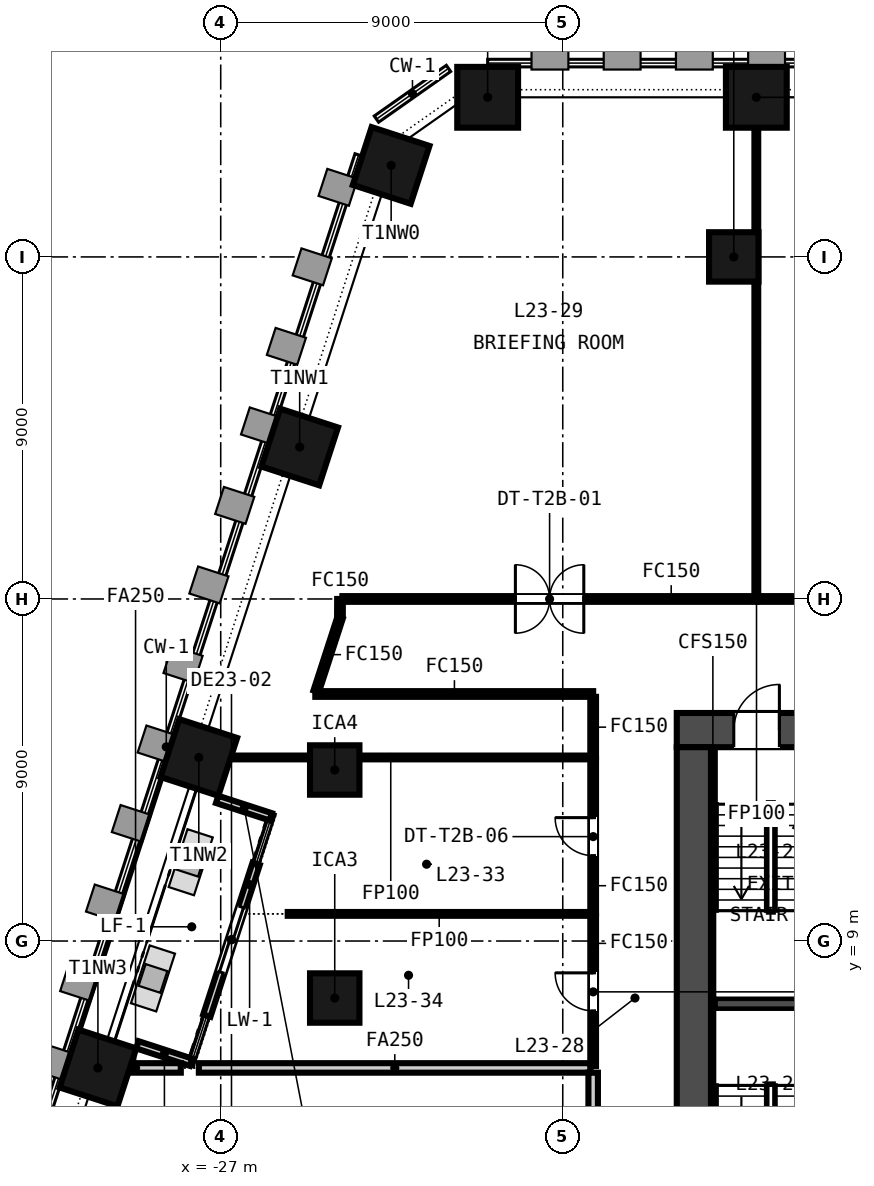
"""IFC4 building model, lengths in metres.
Left out: names, types, materials, properties, quantities, classifications, styles, units other than length and angle.
Written with IfcOpenShell. Run it as: python <this file> out.ifc"""

import sys

from ifc_helpers import new_model, si_unit, direction, frame, frame_2d, origin, origin_2d, place, context, subcontext, project, spatial, rectangle, extrude, element, fill, save


model = new_model("IFC4")
c1 = context("Model", 3, precision=1e-05, world=origin(), true_north=direction((0.0, 1.0)))
c2 = subcontext(c1, "Body", "Model", "MODEL_VIEW")
j1 = project(units=[si_unit("LENGTHUNIT", "METRE"), si_unit("PLANEANGLEUNIT", "RADIAN")], contexts=[c1])
p1 = place(None, origin())
s1 = spatial("IfcSite", under=j1, at=p1, CompositionType="ELEMENT")
p2 = place(p1, origin())
s2 = spatial("IfcBuilding", under=s1, at=p2, CompositionType="ELEMENT")
p3 = place(p2, frame((0.0, 0.0, 98.9)))
s3 = spatial("IfcBuildingStorey", under=s2, at=p3, CompositionType="ELEMENT", Elevation=98.9)
p4 = place(p3, frame((-15.0, 14.55, -0.15), z_axis=(0.0, 0.0, 1.0), x_axis=(1.0, 0.0, 0.0)))
e1 = element("IfcWall", 1, at=p4, inside=s3, PredefinedType="SOLIDWALL", context=c2, shape_type="SweptSolid", body=[
    extrude(rectangle(XDim=30.0, YDim=0.9, at=frame_2d((15.0, 0.0))), origin(), (0.0, 0.0, 1.0), 3.65),
])
p5 = place(p4, frame((9.25, 0.0, 0.15)))
e2 = element("IfcOpeningElement", 2, at=p5, cuts=e1, PredefinedType="OPENING", context=c2, shape_type="SweptSolid", body=[
    extrude(rectangle(XDim=1.5, YDim=2.1, at=frame_2d((0.75, 1.05))), frame((0.0, 0.46, 0.0), z_axis=(0.0, -1.0, 0.0), x_axis=(1.0, 0.0, 0.0)), (0.0, 0.0, 1.0), 0.92),
])
p6 = place(p4, frame((19.4, 0.0, 0.15)))
e3 = element("IfcOpeningElement", 3, at=p6, cuts=e1, PredefinedType="OPENING", context=c2, shape_type="SweptSolid", body=[
    extrude(rectangle(XDim=1.5, YDim=2.1, at=frame_2d((0.75, 1.05))), frame((0.0, 0.46, 0.0), z_axis=(0.0, -1.0, 0.0), x_axis=(1.0, 0.0, 0.0)), (0.0, 0.0, 1.0), 0.92),
])
p7 = place(p4, frame((1.5, 0.0, 0.15)))
e4 = element("IfcOpeningElement", 4, at=p7, cuts=e1, PredefinedType="OPENING", context=c2, shape_type="SweptSolid", body=[
    extrude(rectangle(XDim=1.2, YDim=2.1, at=frame_2d((0.6, 1.05))), frame((0.0, 0.46, 0.0), z_axis=(0.0, -1.0, 0.0), x_axis=(1.0, 0.0, 0.0)), (0.0, 0.0, 1.0), 0.92),
])
p8 = place(p4, frame((27.3, 0.0, 0.15)))
e5 = element("IfcOpeningElement", 5, at=p8, cuts=e1, PredefinedType="OPENING", context=c2, shape_type="SweptSolid", body=[
    extrude(rectangle(XDim=1.2, YDim=2.1, at=frame_2d((0.6, 1.05))), frame((0.0, 0.46, 0.0), z_axis=(0.0, -1.0, 0.0), x_axis=(1.0, 0.0, 0.0)), (0.0, 0.0, 1.0), 0.92),
])
p9 = place(p3, frame((-14.55, 0.9, -0.15), z_axis=(0.0, 0.0, 1.0), x_axis=(0.0, 1.0, 0.0)))
e6 = element("IfcWall", 6, at=p9, inside=s3, PredefinedType="SOLIDWALL", context=c2, shape_type="SweptSolid", body=[
    extrude(rectangle(XDim=13.2, YDim=0.9, at=frame_2d((6.6, 0.0))), origin(), (0.0, 0.0, 1.0), 3.65),
])
for number, where, z_axis, x_axis in (
    (7, (-12.907, 31.2, -0.15), (0.0, 0.0, 1.0), (-1.0, 0.0, 0.0)),
    (8, (-19.976, 31.2, -0.15), (0.0, 0.0, 1.0), (-1.0, 0.0, 0.0)),
    (9, (-22.515, 29.407, -0.15), (0.0, 0.0, 1.0), (-0.309, -0.951, 0.0)),
    (10, (-24.923, 21.999, -0.15), (0.0, 0.0, 1.0), (-0.309, -0.951, 0.0)),
    (11, (-27.577, 13.83, -0.15), (0.0, 0.0, 1.0), (-0.309, -0.951, 0.0)),
    (12, (-30.231, 5.661, -0.15), (0.0, 0.0, 1.0), (-0.309, -0.951, 0.0)),
):
    element("IfcColumn", number, at=place(p3, frame(where, z_axis=z_axis, x_axis=x_axis)), inside=s3, PredefinedType="COLUMN", context=c2, shape_type="SweptSolid", body=[
        extrude(rectangle(XDim=1.6, YDim=1.6, at=origin_2d()), origin(), (0.0, 0.0, 1.0), 3.65),
    ])
for number, where, z_axis, x_axis in (
    (13, (-24.0, 7.5, -0.15), (0.0, 0.0, 1.0), (1.0, 0.0, 0.0)),
    (14, (-24.0, 13.5, -0.15), (0.0, 0.0, 1.0), (1.0, 0.0, 0.0)),
    (15, (-13.5, 27.0, -0.15), (0.0, 0.0, 1.0), (1.0, 0.0, 0.0)),
):
    element("IfcColumn", number, at=place(p3, frame(where, z_axis=z_axis, x_axis=x_axis)), inside=s3, PredefinedType="COLUMN", context=c2, shape_type="SweptSolid", body=[
        extrude(rectangle(XDim=1.3, YDim=1.3, at=origin_2d()), origin(), (0.0, 0.0, 1.0), 3.65),
    ])
p10 = place(p3, frame((-26.068, 11.032, 0.0), z_axis=(0.0, 0.0, 1.0), x_axis=(-0.30901640812, -0.951056706781, 0.0)))
e16 = element("IfcWall", 16, at=p10, inside=s3, PredefinedType="SOLIDWALL", context=c2, shape_type="SweptSolid", body=[
    extrude(rectangle(XDim=4.2, YDim=0.2, at=frame_2d((2.1, 0.0))), origin(), (0.0, 0.0, 1.0), 2.967),
])
p11 = place(p10, frame((1.2, 0.0, 0.0)))
e17 = element("IfcOpeningElement", 17, at=p11, cuts=e16, PredefinedType="OPENING", context=c2, shape_type="SweptSolid", body=[
    extrude(rectangle(XDim=1.8, YDim=2.4, at=frame_2d((0.9, 1.2))), frame((0.0, 0.11, 0.0), z_axis=(0.0, -1.0, 0.0), x_axis=(1.0, 0.0, 0.0)), (0.0, 0.0, 1.0), 0.22),
])
for number, where, z_axis, x_axis in (
    (18, (-27.094, 12.727, 0.0), (0.0, 0.0, 1.0), (0.951, -0.309, 0.0)),
    (19, (-29.192, 6.27, 0.0), (0.0, 0.0, 1.0), (0.951, -0.309, 0.0)),
):
    element("IfcWall", number, at=place(p3, frame(where, z_axis=z_axis, x_axis=x_axis)), inside=s3, PredefinedType="SOLIDWALL", context=c2, shape_type="SweptSolid", body=[
        extrude(rectangle(XDim=1.484, YDim=0.2, at=frame_2d((0.742, 0.0))), origin(), (0.0, 0.0, 1.0), 3.05),
    ])
p12 = place(p3, frame((-14.0, 7.35, 0.0), z_axis=(0.0, 0.0, 1.0), x_axis=(1.0, 0.0, 0.0)))
e20 = element("IfcWall", 20, at=p12, inside=s3, PredefinedType="SOLIDWALL", context=c2, shape_type="SweptSolid", body=[
    extrude(rectangle(XDim=2.95, YDim=0.3, at=frame_2d((1.475, 0.0))), origin(), (0.0, 0.0, 1.0), 3.5),
])
p13 = place(p3, frame((-14.05, 0.9, 0.0), z_axis=(0.0, 0.0, 1.0), x_axis=(0.0, 1.0, 0.0)))
e21 = element("IfcWall", 21, at=p13, inside=s3, PredefinedType="SOLIDWALL", context=c2, shape_type="SweptSolid", body=[
    extrude(rectangle(XDim=13.2, YDim=0.1, at=frame_2d((6.6, 0.0))), origin(), (0.0, 0.0, 1.0), 3.5),
])
p14 = place(p3, frame((-17.2, 15.5, 0.0), z_axis=(0.0, 0.0, 1.0), x_axis=(-1.0, 0.0, 0.0)))
e22 = element("IfcWall", 22, at=p14, inside=s3, PredefinedType="PARTITIONING", context=c2, shape_type="SweptSolid", body=[
    extrude(rectangle(XDim=7.311, YDim=0.15, at=frame_2d((3.656, 0.0))), origin(), (0.0, 0.0, 1.0), 2.741),
])
p15 = place(p3, frame((-24.488, 15.571, 0.0), z_axis=(0.0, 0.0, 1.0), x_axis=(0.309031629186, 0.951051761032, 0.0)))
e23 = element("IfcWall", 23, at=p15, inside=s3, PredefinedType="PARTITIONING", context=c2, shape_type="SweptSolid", body=[
    extrude(rectangle(XDim=2.028, YDim=0.15, at=frame_2d((1.014, 0.0))), origin(), (0.0, 0.0, 1.0), 2.741),
])
p16 = place(p3, frame((-23.863, 17.573, 0.0), z_axis=(0.0, 0.0, 1.0), x_axis=(0.004002254967, 0.999991990946, 0.0)))
e24 = element("IfcWall", 24, at=p16, inside=s3, PredefinedType="PARTITIONING", context=c2, shape_type="SweptSolid", body=[
    extrude(rectangle(XDim=0.427, YDim=0.15, at=frame_2d((0.213, 0.0))), origin(), (0.0, 0.0, 1.0), 2.741),
])
p17 = place(p3, frame((-23.786, 18.0, 0.0), z_axis=(0.0, 0.0, 1.0), x_axis=(1.0, 0.0, 0.0)))
e25 = element("IfcWall", 25, at=p17, inside=s3, PredefinedType="PARTITIONING", context=c2, shape_type="SweptSolid", body=[
    extrude(rectangle(XDim=10.879, YDim=0.15, at=frame_2d((5.439, 0.0))), origin(), (0.0, 0.0, 1.0), 2.741),
])
p18 = place(p17, frame((4.54, 0.0, 0.0)))
e26 = element("IfcOpeningElement", 26, at=p18, cuts=e25, PredefinedType="OPENING", context=c2, shape_type="SweptSolid", body=[
    extrude(rectangle(XDim=1.8, YDim=2.1, at=frame_2d((0.9, 1.05))), frame((0.0, 0.085, 0.0), z_axis=(0.0, -1.0, 0.0), x_axis=(1.0, 0.0, 0.0)), (0.0, 0.0, 1.0), 0.17),
])
p19 = place(p3, frame((-17.2, 13.83, 0.0), z_axis=(0.0, 0.0, 1.0), x_axis=(0.0, 1.0, 0.0)))
e27 = element("IfcWall", 27, at=p19, inside=s3, PredefinedType="PARTITIONING", context=c2, shape_type="SweptSolid", body=[
    extrude(rectangle(XDim=1.595, YDim=0.15, at=frame_2d((0.797, 0.0))), origin(), (0.0, 0.0, 1.0), 2.741),
])
p20 = place(p3, frame((-12.907, 18.075, 0.0), z_axis=(0.0, 0.0, 1.0), x_axis=(0.0, 1.0, 0.0)))
e28 = element("IfcWall", 28, at=p20, inside=s3, PredefinedType="PARTITIONING", context=c2, shape_type="SweptSolid", body=[
    extrude(rectangle(XDim=13.325, YDim=0.1, at=frame_2d((6.663, 0.0))), origin(), (0.0, 0.0, 1.0), 2.741),
])
p21 = place(p3, frame((-27.787, 13.83, 0.0), z_axis=(0.0, 0.0, 1.0), x_axis=(1.0, 0.0, 0.0)))
e29 = element("IfcWall", 29, at=p21, inside=s3, PredefinedType="PARTITIONING", context=c2, shape_type="SweptSolid", body=[
    extrude(rectangle(XDim=10.512, YDim=0.1, at=frame_2d((5.256, 0.0))), origin(), (0.0, 0.0, 1.0), 2.741),
])
p22 = place(p3, frame((-12.857, 18.0, 0.0), z_axis=(0.0, 0.0, 1.0), x_axis=(1.0, 0.0, 0.0)))
e30 = element("IfcWall", 30, at=p22, inside=s3, PredefinedType="PARTITIONING", context=c2, shape_type="SweptSolid", body=[
    extrude(rectangle(XDim=5.857, YDim=0.15, at=frame_2d((2.928, 0.0))), origin(), (0.0, 0.0, 1.0), 2.741),
])
p23 = place(p3, frame((-17.2, 9.714, 0.0), z_axis=(0.0, 0.0, 1.0), x_axis=(0.0, 1.0, 0.0)))
e31 = element("IfcWall", 31, at=p23, inside=s3, PredefinedType="PARTITIONING", context=c2, shape_type="SweptSolid", body=[
    extrude(rectangle(XDim=4.066, YDim=0.15, at=frame_2d((2.033, 0.0))), origin(), (0.0, 0.0, 1.0), 2.741),
])
p24 = place(p23, frame((1.533, 0.0, 0.0)))
e32 = element("IfcOpeningElement", 32, at=p24, cuts=e31, PredefinedType="OPENING", context=c2, shape_type="SweptSolid", body=[
    extrude(rectangle(XDim=1.0, YDim=2.1, at=frame_2d((0.5, 1.05))), frame((0.0, 0.085, 0.0), z_axis=(0.0, -1.0, 0.0), x_axis=(1.0, 0.0, 0.0)), (0.0, 0.0, 1.0), 0.17),
])
p25 = place(p3, frame((-25.237, 9.714, 0.0), z_axis=(0.0, 0.0, 1.0), x_axis=(1.0, 0.0, 0.0)))
e33 = element("IfcWall", 33, at=p25, inside=s3, PredefinedType="PARTITIONING", context=c2, shape_type="SweptSolid", body=[
    extrude(rectangle(XDim=7.962, YDim=0.1, at=frame_2d((3.981, 0.0))), origin(), (0.0, 0.0, 1.0), 2.741),
])
p26 = place(p3, frame((-17.2, 5.711, 0.0), z_axis=(0.0, 0.0, 1.0), x_axis=(0.0, 1.0, 0.0)))
e34 = element("IfcWall", 34, at=p26, inside=s3, PredefinedType="PARTITIONING", context=c2, shape_type="SweptSolid", body=[
    extrude(rectangle(XDim=3.953, YDim=0.15, at=frame_2d((1.977, 0.0))), origin(), (0.0, 0.0, 1.0), 2.741),
])
p27 = place(p26, frame((1.451, 0.0, 0.0)))
e35 = element("IfcOpeningElement", 35, at=p27, cuts=e34, PredefinedType="OPENING", context=c2, shape_type="SweptSolid", body=[
    extrude(rectangle(XDim=1.0, YDim=2.1, at=frame_2d((0.5, 1.05))), frame((0.0, 0.085, 0.0), z_axis=(0.0, -1.0, 0.0), x_axis=(1.0, 0.0, 0.0)), (0.0, 0.0, 1.0), 0.17),
])
p28 = place(p3, frame((-30.441, 5.661, 0.0), z_axis=(0.0, 0.0, 1.0), x_axis=(1.0, 0.0, 0.0)))
e36 = element("IfcWall", 36, at=p28, inside=s3, PredefinedType="PARTITIONING", context=c2, shape_type="SweptSolid", body=[
    extrude(rectangle(XDim=2.391, YDim=0.25, at=frame_2d((1.195, 0.0))), origin(), (0.0, 0.0, 1.0), 2.741),
])
p29 = place(p3, frame((-27.575, 5.661, 0.0), z_axis=(0.0, 0.0, 1.0), x_axis=(1.0, 0.0, 0.0)))
e37 = element("IfcWall", 37, at=p29, inside=s3, PredefinedType="PARTITIONING", context=c2, shape_type="SweptSolid", body=[
    extrude(rectangle(XDim=10.3, YDim=0.25, at=frame_2d((5.15, 0.0))), origin(), (0.0, 0.0, 1.0), 2.741),
])
p30 = place(p3, frame((-17.2, -3.188, 0.0), z_axis=(0.0, 0.0, 1.0), x_axis=(0.0, 1.0, 0.0)))
e38 = element("IfcWall", 38, at=p30, inside=s3, PredefinedType="PARTITIONING", context=c2, shape_type="SweptSolid", body=[
    extrude(rectangle(XDim=8.724, YDim=0.25, at=frame_2d((4.362, 0.0))), origin(), (0.0, 0.0, 1.0), 2.741),
])
p31 = place(p30, frame((3.462, 0.0, 0.0)))
e39 = element("IfcOpeningElement", 39, at=p31, cuts=e38, PredefinedType="OPENING", context=c2, shape_type="SweptSolid", body=[
    extrude(rectangle(XDim=1.8, YDim=2.1, at=frame_2d((0.9, 1.05))), frame((0.0, 0.135, 0.0), z_axis=(0.0, -1.0, 0.0), x_axis=(1.0, 0.0, 0.0)), (0.0, 0.0, 1.0), 0.27),
])
p32 = place(p11, origin())
e40 = element("IfcDoor", 40, at=p32, inside=s3, OperationType="SINGLE_SWING_LEFT", PredefinedType="DOOR", context=c2, shape_type="SweptSolid", body=[
    extrude(rectangle(XDim=1.8, YDim=2.4, at=frame_2d((0.9, 1.2))), frame((0.0, 0.025, 0.0), z_axis=(0.0, -1.0, 0.0), x_axis=(1.0, 0.0, 0.0)), (0.0, 0.0, 1.0), 0.05),
])
fill(e17, e40)
p33 = place(p7, origin())
e41 = element("IfcDoor", 41, at=p33, inside=s3, OperationType="SINGLE_SWING_RIGHT", PredefinedType="DOOR", context=c2, shape_type="SweptSolid", body=[
    extrude(rectangle(XDim=1.2, YDim=2.1, at=frame_2d((0.6, 1.05))), frame((0.0, 0.025, 0.0), z_axis=(0.0, -1.0, 0.0), x_axis=(1.0, 0.0, 0.0)), (0.0, 0.0, 1.0), 0.05),
])
fill(e4, e41)
p34 = place(p18, origin())
e42 = element("IfcDoor", 42, at=p34, inside=s3, OperationType="DOUBLE_DOOR_DOUBLE_SWING", PredefinedType="DOOR", context=c2, shape_type="SweptSolid", body=[
    extrude(rectangle(XDim=1.8, YDim=2.1, at=frame_2d((0.9, 1.05))), frame((0.0, 0.025, 0.0), z_axis=(0.0, -1.0, 0.0), x_axis=(1.0, 0.0, 0.0)), (0.0, 0.0, 1.0), 0.05),
])
fill(e26, e42)
p35 = place(p24, origin())
e43 = element("IfcDoor", 43, at=p35, inside=s3, OperationType="SINGLE_SWING_RIGHT", PredefinedType="DOOR", context=c2, shape_type="SweptSolid", body=[
    extrude(rectangle(XDim=1.0, YDim=2.1, at=frame_2d((0.5, 1.05))), frame((0.0, 0.025, 0.0), z_axis=(0.0, -1.0, 0.0), x_axis=(1.0, 0.0, 0.0)), (0.0, 0.0, 1.0), 0.05),
])
fill(e32, e43)
p36 = place(p27, origin())
e44 = element("IfcDoor", 44, at=p36, inside=s3, OperationType="SINGLE_SWING_RIGHT", PredefinedType="DOOR", context=c2, shape_type="SweptSolid", body=[
    extrude(rectangle(XDim=1.0, YDim=2.1, at=frame_2d((0.5, 1.05))), frame((0.0, 0.025, 0.0), z_axis=(0.0, -1.0, 0.0), x_axis=(1.0, 0.0, 0.0)), (0.0, 0.0, 1.0), 0.05),
])
fill(e35, e44)
save(model, sys.argv[1])
